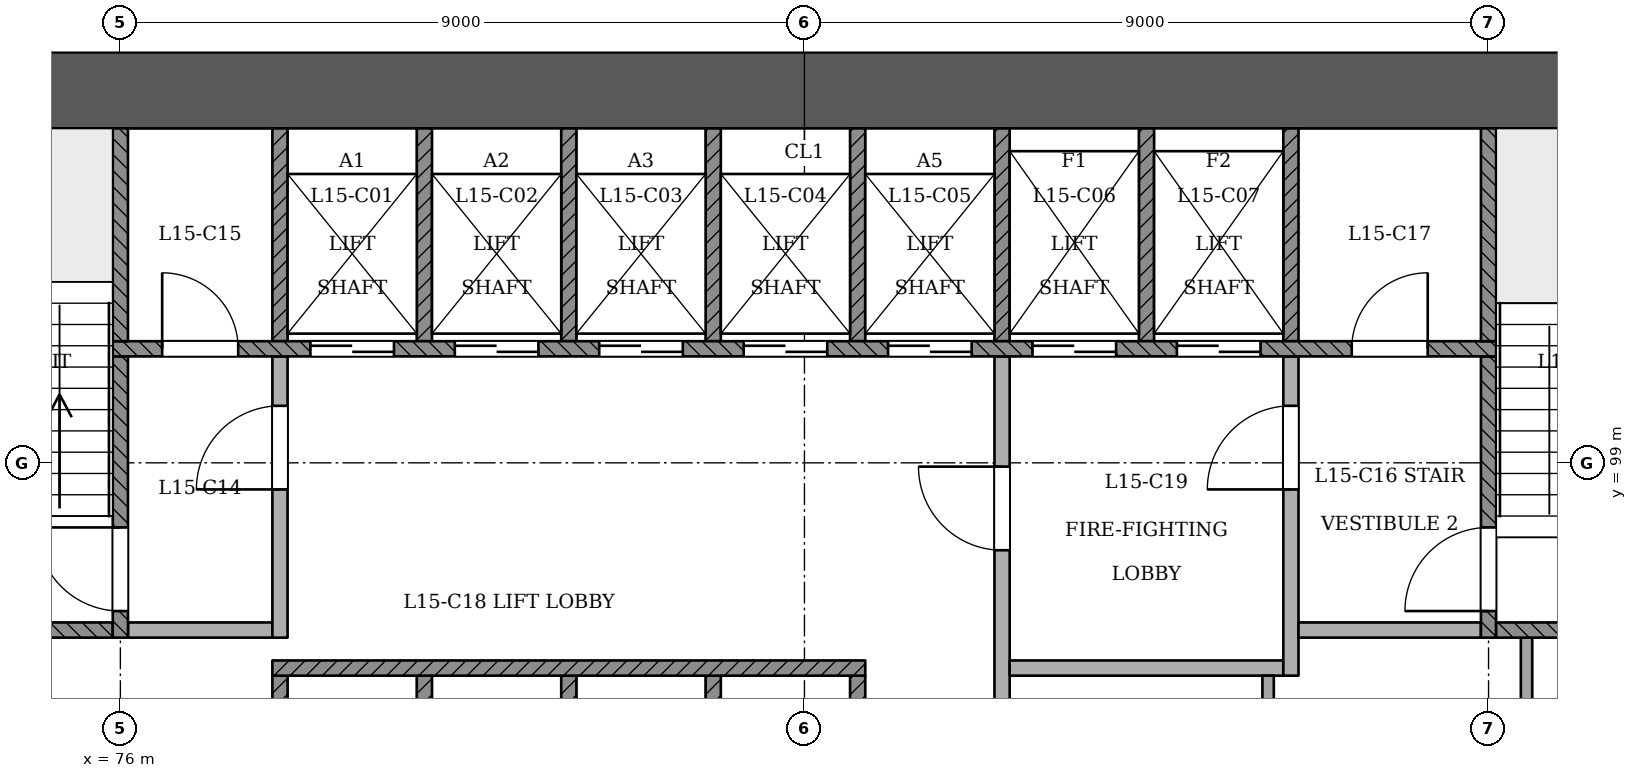
"""IFC4 building model, lengths in metres.
Left out: names, types, materials, properties, quantities, classifications, styles, units other than length and angle.
Written with IfcOpenShell. Run it as: python <this file> out.ifc"""

import sys

from ifc_helpers import new_model, si_unit, direction, frame, frame_2d, origin, place, context, subcontext, project, spatial, rectangle, extrude, element, fill, save


model = new_model("IFC4")
c1 = context("Model", 3, precision=1e-05, world=origin(), true_north=direction((0.0, 1.0)))
c2 = subcontext(c1, "Body", "Model", "MODEL_VIEW")
j1 = project(units=[si_unit("LENGTHUNIT", "METRE"), si_unit("PLANEANGLEUNIT", "RADIAN")], contexts=[c1])
p1 = place(None, origin())
s1 = spatial("IfcSite", under=j1, at=p1, CompositionType="ELEMENT")
p2 = place(p1, origin())
s2 = spatial("IfcBuilding", under=s1, at=p2, CompositionType="ELEMENT")
p3 = place(p2, frame((0.0, 0.0, 63.0)))
s3 = spatial("IfcBuildingStorey", under=s2, at=p3, CompositionType="ELEMENT", Elevation=63.0)
p4 = place(p3, frame((97.5, 103.9, 0.0), z_axis=(0.0, 0.0, 1.0), x_axis=(-1.0, 0.0, 0.0)))
e1 = element("IfcWall", 1, at=p4, inside=s3, PredefinedType="SHEAR", context=c2, shape_type="SweptSolid", body=[
    extrude(rectangle(XDim=25.5, YDim=1.0, at=frame_2d((12.75, 0.0))), origin(), (0.0, 0.0, 1.0), 3.6),
])
p5 = place(p3, frame((62.347, 97.006, 0.0), z_axis=(0.0, 0.0, 1.0), x_axis=(0.500001772576, -0.866024380385, 0.0)))
e2 = element("IfcWall", 2, at=p5, inside=s3, PredefinedType="PARTITIONING", context=c2, shape_type="SweptSolid", body=[
    extrude(rectangle(XDim=43.58, YDim=0.15, at=frame_2d((21.79, 0.0))), origin(), (0.0, 0.0, 1.0), 2.7),
])
p6 = place(p5, frame((3.55, 0.0, 0.0)))
e3 = element("IfcOpeningElement", 3, at=p6, cuts=e2, PredefinedType="OPENING", context=c2, shape_type="SweptSolid", body=[
    extrude(rectangle(XDim=1.2, YDim=2.1, at=frame_2d((0.6, 1.05))), frame((0.0, 0.085, 0.0), z_axis=(0.0, -1.0, 0.0), x_axis=(1.0, 0.0, 0.0)), (0.0, 0.0, 1.0), 0.171),
])
p7 = place(p5, frame((12.19, 0.0, 0.0)))
e4 = element("IfcOpeningElement", 4, at=p7, cuts=e2, PredefinedType="OPENING", context=c2, shape_type="SweptSolid", body=[
    extrude(rectangle(XDim=1.2, YDim=2.1, at=frame_2d((0.6, 1.05))), frame((0.0, 0.085, 0.0), z_axis=(0.0, -1.0, 0.0), x_axis=(1.0, 0.0, 0.0)), (0.0, 0.0, 1.0), 0.171),
])
p8 = place(p5, frame((19.04, 0.0, 0.0)))
e5 = element("IfcOpeningElement", 5, at=p8, cuts=e2, PredefinedType="OPENING", context=c2, shape_type="SweptSolid", body=[
    extrude(rectangle(XDim=1.0, YDim=2.1, at=frame_2d((0.5, 1.05))), frame((0.0, 0.085, 0.0), z_axis=(0.0, -1.0, 0.0), x_axis=(1.0, 0.0, 0.0)), (0.0, 0.0, 1.0), 0.171),
])
p9 = place(p5, frame((27.94, 0.0, 0.0)))
e6 = element("IfcOpeningElement", 6, at=p9, cuts=e2, PredefinedType="OPENING", context=c2, shape_type="SweptSolid", body=[
    extrude(rectangle(XDim=1.2, YDim=2.1, at=frame_2d((0.6, 1.05))), frame((0.0, 0.085, 0.0), z_axis=(0.0, -1.0, 0.0), x_axis=(1.0, 0.0, 0.0)), (0.0, 0.0, 1.0), 0.171),
])
p10 = place(p5, frame((38.831, 0.0, 0.0)))
e7 = element("IfcOpeningElement", 7, at=p10, cuts=e2, PredefinedType="OPENING", context=c2, shape_type="SweptSolid", body=[
    extrude(rectangle(XDim=1.2, YDim=2.1, at=frame_2d((0.6, 1.05))), frame((0.0, 0.085, 0.0), z_axis=(0.0, -1.0, 0.0), x_axis=(1.0, 0.0, 0.0)), (0.0, 0.0, 1.0), 0.171),
])
p11 = place(p3, frame((85.862, 59.265, 0.0), z_axis=(0.0, 0.0, 1.0), x_axis=(0.500001772576, 0.866024380385, 0.0)))
e8 = element("IfcWall", 8, at=p11, inside=s3, PredefinedType="PARTITIONING", context=c2, shape_type="SweptSolid", body=[
    extrude(rectangle(XDim=43.58, YDim=0.15, at=frame_2d((21.79, 0.0))), origin(), (0.0, 0.0, 1.0), 2.7),
])
p12 = place(p11, frame((3.55, 0.0, 0.0)))
e9 = element("IfcOpeningElement", 9, at=p12, cuts=e8, PredefinedType="OPENING", context=c2, shape_type="SweptSolid", body=[
    extrude(rectangle(XDim=1.2, YDim=2.1, at=frame_2d((0.6, 1.05))), frame((0.0, 0.085, 0.0), z_axis=(0.0, -1.0, 0.0), x_axis=(1.0, 0.0, 0.0)), (0.0, 0.0, 1.0), 0.171),
])
p13 = place(p11, frame((14.44, 0.0, 0.0)))
e10 = element("IfcOpeningElement", 10, at=p13, cuts=e8, PredefinedType="OPENING", context=c2, shape_type="SweptSolid", body=[
    extrude(rectangle(XDim=1.2, YDim=2.1, at=frame_2d((0.6, 1.05))), frame((0.0, 0.085, 0.0), z_axis=(0.0, -1.0, 0.0), x_axis=(1.0, 0.0, 0.0)), (0.0, 0.0, 1.0), 0.171),
])
p14 = place(p11, frame((27.94, 0.0, 0.0)))
e11 = element("IfcOpeningElement", 11, at=p14, cuts=e8, PredefinedType="OPENING", context=c2, shape_type="SweptSolid", body=[
    extrude(rectangle(XDim=1.2, YDim=2.1, at=frame_2d((0.6, 1.05))), frame((0.0, 0.085, 0.0), z_axis=(0.0, -1.0, 0.0), x_axis=(1.0, 0.0, 0.0)), (0.0, 0.0, 1.0), 0.171),
])
p15 = place(p11, frame((38.831, 0.0, 0.0)))
e12 = element("IfcOpeningElement", 12, at=p15, cuts=e8, PredefinedType="OPENING", context=c2, shape_type="SweptSolid", body=[
    extrude(rectangle(XDim=1.2, YDim=2.1, at=frame_2d((0.6, 1.05))), frame((0.0, 0.085, 0.0), z_axis=(0.0, -1.0, 0.0), x_axis=(1.0, 0.0, 0.0)), (0.0, 0.0, 1.0), 0.171),
])
for number, where, z_axis, x_axis in (
    (13, (78.1, 93.4, 0.0), (0.0, 0.0, 1.0), (0.0, 1.0, 0.0)),
    (14, (80.0, 93.4, 0.0), (0.0, 0.0, 1.0), (0.0, 1.0, 0.0)),
    (15, (81.9, 93.4, 0.0), (0.0, 0.0, 1.0), (0.0, 1.0, 0.0)),
    (16, (83.8, 93.4, 0.0), (0.0, 0.0, 1.0), (0.0, 1.0, 0.0)),
    (17, (85.7, 93.4, 0.0), (0.0, 0.0, 1.0), (0.0, 1.0, 0.0)),
):
    element("IfcWall", number, at=place(p3, frame(where, z_axis=z_axis, x_axis=x_axis)), inside=s3, PredefinedType="SOLIDWALL", context=c2, shape_type="SweptSolid", body=[
        extrude(rectangle(XDim=2.8, YDim=0.2, at=frame_2d((1.4, 0.0))), origin(), (0.0, 0.0, 1.0), 3.1),
    ])
p16 = place(p3, frame((87.6, 93.4, 0.0), z_axis=(0.0, 0.0, 1.0), x_axis=(0.0, 1.0, 0.0)))
e18 = element("IfcWall", 18, at=p16, inside=s3, PredefinedType="PARTITIONING", context=c2, shape_type="SweptSolid", body=[
    extrude(rectangle(XDim=7.0, YDim=0.2, at=frame_2d((3.5, 0.0))), origin(), (0.0, 0.0, 1.0), 3.1),
])
p17 = place(p16, frame((4.45, 0.0, 0.0)))
e19 = element("IfcOpeningElement", 19, at=p17, cuts=e18, PredefinedType="OPENING", context=c2, shape_type="SweptSolid", body=[
    extrude(rectangle(XDim=1.1, YDim=2.1, at=frame_2d((0.55, 1.05))), frame((0.0, 0.11, 0.0), z_axis=(0.0, -1.0, 0.0), x_axis=(1.0, 0.0, 0.0)), (0.0, 0.0, 1.0), 0.221),
])
p18 = place(p3, frame((91.1, 93.4, 0.0), z_axis=(0.0, 0.0, 1.0), x_axis=(0.0, 1.0, 0.0)))
e20 = element("IfcWall", 20, at=p18, inside=s3, PredefinedType="PARTITIONING", context=c2, shape_type="SweptSolid", body=[
    extrude(rectangle(XDim=2.8, YDim=0.15, at=frame_2d((1.4, 0.0))), origin(), (0.0, 0.0, 1.0), 3.1),
])
p19 = place(p3, frame((94.5, 93.4, 0.0), z_axis=(0.0, 0.0, 1.0), x_axis=(0.0, 1.0, 0.0)))
e21 = element("IfcWall", 21, at=p19, inside=s3, PredefinedType="PARTITIONING", context=c2, shape_type="SweptSolid", body=[
    extrude(rectangle(XDim=3.3, YDim=0.15, at=frame_2d((1.65, 0.0))), origin(), (0.0, 0.0, 1.0), 3.1),
])
p20 = place(p3, frame((78.0, 96.3, 0.0), z_axis=(0.0, 0.0, 1.0), x_axis=(1.0, 0.0, 0.0)))
e22 = element("IfcWall", 22, at=p20, inside=s3, PredefinedType="SOLIDWALL", context=c2, shape_type="SweptSolid", body=[
    extrude(rectangle(XDim=7.8, YDim=0.2, at=frame_2d((3.9, 0.0))), origin(), (0.0, 0.0, 1.0), 3.1),
])
p21 = place(p3, frame((87.7, 96.3, 0.0), z_axis=(0.0, 0.0, 1.0), x_axis=(1.0, 0.0, 0.0)))
e23 = element("IfcWall", 23, at=p21, inside=s3, PredefinedType="PARTITIONING", context=c2, shape_type="SweptSolid", body=[
    extrude(rectangle(XDim=3.6, YDim=0.2, at=frame_2d((1.8, 0.0))), origin(), (0.0, 0.0, 1.0), 3.1),
])
p22 = place(p3, frame((91.4, 96.2, 0.0), z_axis=(0.0, 0.0, 1.0), x_axis=(0.0, 1.0, 0.0)))
e24 = element("IfcWall", 24, at=p22, inside=s3, PredefinedType="PARTITIONING", context=c2, shape_type="SweptSolid", body=[
    extrude(rectangle(XDim=4.2, YDim=0.2, at=frame_2d((2.1, 0.0))), origin(), (0.0, 0.0, 1.0), 3.1),
])
p23 = place(p22, frame((2.45, 0.0, 0.0)))
e25 = element("IfcOpeningElement", 25, at=p23, cuts=e24, PredefinedType="OPENING", context=c2, shape_type="SweptSolid", body=[
    extrude(rectangle(XDim=1.1, YDim=2.1, at=frame_2d((0.55, 1.05))), frame((0.0, 0.11, 0.0), z_axis=(0.0, -1.0, 0.0), x_axis=(1.0, 0.0, 0.0)), (0.0, 0.0, 1.0), 0.221),
])
p24 = place(p3, frame((73.0, 96.8, 0.0), z_axis=(0.0, 0.0, 1.0), x_axis=(1.0, 0.0, 0.0)))
e26 = element("IfcWall", 26, at=p24, inside=s3, PredefinedType="SOLIDWALL", context=c2, shape_type="SweptSolid", body=[
    extrude(rectangle(XDim=2.9, YDim=0.2, at=frame_2d((1.45, 0.0))), origin(), (0.0, 0.0, 1.0), 3.1),
])
p25 = place(p3, frame((76.0, 96.7, 0.0), z_axis=(0.0, 0.0, 1.0), x_axis=(0.0, 1.0, 0.0)))
e27 = element("IfcWall", 27, at=p25, inside=s3, PredefinedType="SOLIDWALL", context=c2, shape_type="SweptSolid", body=[
    extrude(rectangle(XDim=3.7, YDim=0.2, at=frame_2d((1.85, 0.0))), origin(), (0.0, 0.0, 1.0), 3.1),
])
p26 = place(p25, frame((0.35, 0.0, 0.0)))
e28 = element("IfcOpeningElement", 28, at=p26, cuts=e27, PredefinedType="OPENING", context=c2, shape_type="SweptSolid", body=[
    extrude(rectangle(XDim=1.1, YDim=2.1, at=frame_2d((0.55, 1.05))), frame((0.0, 0.11, 0.0), z_axis=(0.0, -1.0, 0.0), x_axis=(1.0, 0.0, 0.0)), (0.0, 0.0, 1.0), 0.221),
])
p27 = place(p3, frame((76.1, 96.8, 0.0), z_axis=(0.0, 0.0, 1.0), x_axis=(1.0, 0.0, 0.0)))
e29 = element("IfcWall", 29, at=p27, inside=s3, PredefinedType="PARTITIONING", context=c2, shape_type="SweptSolid", body=[
    extrude(rectangle(XDim=1.9, YDim=0.2, at=frame_2d((0.95, 0.0))), origin(), (0.0, 0.0, 1.0), 3.1),
])
p28 = place(p3, frame((78.1, 96.7, 0.0), z_axis=(0.0, 0.0, 1.0), x_axis=(0.0, 1.0, 0.0)))
e30 = element("IfcWall", 30, at=p28, inside=s3, PredefinedType="PARTITIONING", context=c2, shape_type="SweptSolid", body=[
    extrude(rectangle(XDim=3.7, YDim=0.2, at=frame_2d((1.85, 0.0))), origin(), (0.0, 0.0, 1.0), 3.1),
])
p29 = place(p28, frame((1.95, 0.0, 0.0)))
e31 = element("IfcOpeningElement", 31, at=p29, cuts=e30, PredefinedType="OPENING", context=c2, shape_type="SweptSolid", body=[
    extrude(rectangle(XDim=1.1, YDim=2.1, at=frame_2d((0.55, 1.05))), frame((0.0, 0.11, 0.0), z_axis=(0.0, -1.0, 0.0), x_axis=(1.0, 0.0, 0.0)), (0.0, 0.0, 1.0), 0.221),
])
p30 = place(p3, frame((91.5, 96.8, 0.0), z_axis=(0.0, 0.0, 1.0), x_axis=(1.0, 0.0, 0.0)))
e32 = element("IfcWall", 32, at=p30, inside=s3, PredefinedType="PARTITIONING", context=c2, shape_type="SweptSolid", body=[
    extrude(rectangle(XDim=2.4, YDim=0.2, at=frame_2d((1.2, 0.0))), origin(), (0.0, 0.0, 1.0), 3.1),
])
p31 = place(p3, frame((94.0, 96.7, 0.0), z_axis=(0.0, 0.0, 1.0), x_axis=(0.0, 1.0, 0.0)))
e33 = element("IfcWall", 33, at=p31, inside=s3, PredefinedType="SOLIDWALL", context=c2, shape_type="SweptSolid", body=[
    extrude(rectangle(XDim=3.7, YDim=0.2, at=frame_2d((1.85, 0.0))), origin(), (0.0, 0.0, 1.0), 3.1),
])
p32 = place(p31, frame((0.35, 0.0, 0.0)))
e34 = element("IfcOpeningElement", 34, at=p32, cuts=e33, PredefinedType="OPENING", context=c2, shape_type="SweptSolid", body=[
    extrude(rectangle(XDim=1.1, YDim=2.1, at=frame_2d((0.55, 1.05))), frame((0.0, 0.11, 0.0), z_axis=(0.0, -1.0, 0.0), x_axis=(1.0, 0.0, 0.0)), (0.0, 0.0, 1.0), 0.221),
])
p33 = place(p3, frame((94.1, 96.8, 0.0), z_axis=(0.0, 0.0, 1.0), x_axis=(1.0, 0.0, 0.0)))
e35 = element("IfcWall", 35, at=p33, inside=s3, PredefinedType="SOLIDWALL", context=c2, shape_type="SweptSolid", body=[
    extrude(rectangle(XDim=2.9, YDim=0.2, at=frame_2d((1.45, 0.0))), origin(), (0.0, 0.0, 1.0), 3.1),
])
p34 = place(p3, frame((75.9, 100.5, 0.0), z_axis=(0.0, 0.0, 1.0), x_axis=(1.0, 0.0, 0.0)))
e36 = element("IfcWall", 36, at=p34, inside=s3, PredefinedType="SOLIDWALL", context=c2, shape_type="SweptSolid", body=[
    extrude(rectangle(XDim=18.2, YDim=0.2, at=frame_2d((9.1, 0.0))), origin(), (0.0, 0.0, 1.0), 3.1),
])
p35 = place(p34, frame((2.6, 0.0, 0.0)))
e37 = element("IfcOpeningElement", 37, at=p35, cuts=e36, PredefinedType="OPENING", context=c2, shape_type="SweptSolid", body=[
    extrude(rectangle(XDim=1.1, YDim=2.1, at=frame_2d((0.55, 1.05))), frame((0.0, 0.11, 0.0), z_axis=(0.0, -1.0, 0.0), x_axis=(1.0, 0.0, 0.0)), (0.0, 0.0, 1.0), 0.221),
])
p36 = place(p34, frame((4.5, 0.0, 0.0)))
e38 = element("IfcOpeningElement", 38, at=p36, cuts=e36, PredefinedType="OPENING", context=c2, shape_type="SweptSolid", body=[
    extrude(rectangle(XDim=1.1, YDim=2.1, at=frame_2d((0.55, 1.05))), frame((0.0, 0.11, 0.0), z_axis=(0.0, -1.0, 0.0), x_axis=(1.0, 0.0, 0.0)), (0.0, 0.0, 1.0), 0.221),
])
p37 = place(p34, frame((6.4, 0.0, 0.0)))
e39 = element("IfcOpeningElement", 39, at=p37, cuts=e36, PredefinedType="OPENING", context=c2, shape_type="SweptSolid", body=[
    extrude(rectangle(XDim=1.1, YDim=2.1, at=frame_2d((0.55, 1.05))), frame((0.0, 0.11, 0.0), z_axis=(0.0, -1.0, 0.0), x_axis=(1.0, 0.0, 0.0)), (0.0, 0.0, 1.0), 0.221),
])
p38 = place(p34, frame((8.3, 0.0, 0.0)))
e40 = element("IfcOpeningElement", 40, at=p38, cuts=e36, PredefinedType="OPENING", context=c2, shape_type="SweptSolid", body=[
    extrude(rectangle(XDim=1.1, YDim=2.1, at=frame_2d((0.55, 1.05))), frame((0.0, 0.11, 0.0), z_axis=(0.0, -1.0, 0.0), x_axis=(1.0, 0.0, 0.0)), (0.0, 0.0, 1.0), 0.221),
])
p39 = place(p34, frame((10.2, 0.0, 0.0)))
e41 = element("IfcOpeningElement", 41, at=p39, cuts=e36, PredefinedType="OPENING", context=c2, shape_type="SweptSolid", body=[
    extrude(rectangle(XDim=1.1, YDim=2.1, at=frame_2d((0.55, 1.05))), frame((0.0, 0.11, 0.0), z_axis=(0.0, -1.0, 0.0), x_axis=(1.0, 0.0, 0.0)), (0.0, 0.0, 1.0), 0.221),
])
p40 = place(p34, frame((12.1, 0.0, 0.0)))
e42 = element("IfcOpeningElement", 42, at=p40, cuts=e36, PredefinedType="OPENING", context=c2, shape_type="SweptSolid", body=[
    extrude(rectangle(XDim=1.1, YDim=2.1, at=frame_2d((0.55, 1.05))), frame((0.0, 0.11, 0.0), z_axis=(0.0, -1.0, 0.0), x_axis=(1.0, 0.0, 0.0)), (0.0, 0.0, 1.0), 0.221),
])
p41 = place(p34, frame((14.0, 0.0, 0.0)))
e43 = element("IfcOpeningElement", 43, at=p41, cuts=e36, PredefinedType="OPENING", context=c2, shape_type="SweptSolid", body=[
    extrude(rectangle(XDim=1.1, YDim=2.1, at=frame_2d((0.55, 1.05))), frame((0.0, 0.11, 0.0), z_axis=(0.0, -1.0, 0.0), x_axis=(1.0, 0.0, 0.0)), (0.0, 0.0, 1.0), 0.221),
])
p42 = place(p34, frame((0.65, 0.0, 0.0)))
e44 = element("IfcOpeningElement", 44, at=p42, cuts=e36, PredefinedType="OPENING", context=c2, shape_type="SweptSolid", body=[
    extrude(rectangle(XDim=1.0, YDim=2.1, at=frame_2d((0.5, 1.05))), frame((0.0, 0.11, 0.0), z_axis=(0.0, -1.0, 0.0), x_axis=(1.0, 0.0, 0.0)), (0.0, 0.0, 1.0), 0.221),
])
p43 = place(p34, frame((16.3, 0.0, 0.0)))
e45 = element("IfcOpeningElement", 45, at=p43, cuts=e36, PredefinedType="OPENING", context=c2, shape_type="SweptSolid", body=[
    extrude(rectangle(XDim=1.0, YDim=2.1, at=frame_2d((0.5, 1.05))), frame((0.0, 0.11, 0.0), z_axis=(0.0, -1.0, 0.0), x_axis=(1.0, 0.0, 0.0)), (0.0, 0.0, 1.0), 0.221),
])
for number, where, z_axis, x_axis in (
    (46, (76.0, 100.6, 0.0), (0.0, 0.0, 1.0), (0.0, 1.0, 0.0)),
    (47, (78.1, 100.6, 0.0), (0.0, 0.0, 1.0), (0.0, 1.0, 0.0)),
    (48, (80.0, 100.6, 0.0), (0.0, 0.0, 1.0), (0.0, 1.0, 0.0)),
    (49, (81.9, 100.6, 0.0), (0.0, 0.0, 1.0), (0.0, 1.0, 0.0)),
    (50, (83.8, 100.6, 0.0), (0.0, 0.0, 1.0), (0.0, 1.0, 0.0)),
    (51, (85.7, 100.6, 0.0), (0.0, 0.0, 1.0), (0.0, 1.0, 0.0)),
    (52, (87.6, 100.6, 0.0), (0.0, 0.0, 1.0), (0.0, 1.0, 0.0)),
    (53, (89.5, 100.6, 0.0), (0.0, 0.0, 1.0), (0.0, 1.0, 0.0)),
    (54, (91.4, 100.6, 0.0), (0.0, 0.0, 1.0), (0.0, 1.0, 0.0)),
    (55, (94.0, 100.6, 0.0), (0.0, 0.0, 1.0), (0.0, 1.0, 0.0)),
):
    element("IfcWall", number, at=place(p3, frame(where, z_axis=z_axis, x_axis=x_axis)), inside=s3, PredefinedType="SOLIDWALL", context=c2, shape_type="SweptSolid", body=[
        extrude(rectangle(XDim=2.8, YDim=0.2, at=frame_2d((1.4, 0.0))), origin(), (0.0, 0.0, 1.0), 3.1),
    ])
p44 = place(p35, origin())
e56 = element("IfcDoor", 56, at=p44, inside=s3, OperationType="SLIDING_TO_RIGHT", PredefinedType="NOTDEFINED", context=c2, shape_type="SweptSolid", body=[
    extrude(rectangle(XDim=1.1, YDim=2.1, at=frame_2d((0.55, 1.05))), frame((0.0, 0.025, 0.0), z_axis=(0.0, -1.0, 0.0), x_axis=(1.0, 0.0, 0.0)), (0.0, 0.0, 1.0), 0.05),
])
fill(e37, e56)
p45 = place(p36, origin())
e57 = element("IfcDoor", 57, at=p45, inside=s3, OperationType="SLIDING_TO_LEFT", PredefinedType="NOTDEFINED", context=c2, shape_type="SweptSolid", body=[
    extrude(rectangle(XDim=1.1, YDim=2.1, at=frame_2d((0.55, 1.05))), frame((0.0, 0.025, 0.0), z_axis=(0.0, -1.0, 0.0), x_axis=(1.0, 0.0, 0.0)), (0.0, 0.0, 1.0), 0.05),
])
fill(e38, e57)
p46 = place(p37, origin())
e58 = element("IfcDoor", 58, at=p46, inside=s3, OperationType="SLIDING_TO_RIGHT", PredefinedType="NOTDEFINED", context=c2, shape_type="SweptSolid", body=[
    extrude(rectangle(XDim=1.1, YDim=2.1, at=frame_2d((0.55, 1.05))), frame((0.0, 0.025, 0.0), z_axis=(0.0, -1.0, 0.0), x_axis=(1.0, 0.0, 0.0)), (0.0, 0.0, 1.0), 0.05),
])
fill(e39, e58)
p47 = place(p38, origin())
e59 = element("IfcDoor", 59, at=p47, inside=s3, OperationType="SLIDING_TO_LEFT", PredefinedType="NOTDEFINED", context=c2, shape_type="SweptSolid", body=[
    extrude(rectangle(XDim=1.1, YDim=2.1, at=frame_2d((0.55, 1.05))), frame((0.0, 0.025, 0.0), z_axis=(0.0, -1.0, 0.0), x_axis=(1.0, 0.0, 0.0)), (0.0, 0.0, 1.0), 0.05),
])
fill(e40, e59)
p48 = place(p39, origin())
e60 = element("IfcDoor", 60, at=p48, inside=s3, OperationType="SLIDING_TO_RIGHT", PredefinedType="NOTDEFINED", context=c2, shape_type="SweptSolid", body=[
    extrude(rectangle(XDim=1.1, YDim=2.1, at=frame_2d((0.55, 1.05))), frame((0.0, 0.025, 0.0), z_axis=(0.0, -1.0, 0.0), x_axis=(1.0, 0.0, 0.0)), (0.0, 0.0, 1.0), 0.05),
])
fill(e41, e60)
p49 = place(p40, origin())
e61 = element("IfcDoor", 61, at=p49, inside=s3, OperationType="SLIDING_TO_RIGHT", PredefinedType="NOTDEFINED", context=c2, shape_type="SweptSolid", body=[
    extrude(rectangle(XDim=1.1, YDim=2.1, at=frame_2d((0.55, 1.05))), frame((0.0, 0.025, 0.0), z_axis=(0.0, -1.0, 0.0), x_axis=(1.0, 0.0, 0.0)), (0.0, 0.0, 1.0), 0.05),
])
fill(e42, e61)
p50 = place(p41, origin())
e62 = element("IfcDoor", 62, at=p50, inside=s3, OperationType="SLIDING_TO_LEFT", PredefinedType="NOTDEFINED", context=c2, shape_type="SweptSolid", body=[
    extrude(rectangle(XDim=1.1, YDim=2.1, at=frame_2d((0.55, 1.05))), frame((0.0, 0.025, 0.0), z_axis=(0.0, -1.0, 0.0), x_axis=(1.0, 0.0, 0.0)), (0.0, 0.0, 1.0), 0.05),
])
fill(e43, e62)
p51 = place(p26, origin())
e63 = element("IfcDoor", 63, at=p51, inside=s3, OperationType="SINGLE_SWING_RIGHT", PredefinedType="NOTDEFINED", context=c2, shape_type="SweptSolid", body=[
    extrude(rectangle(XDim=1.1, YDim=2.1, at=frame_2d((0.55, 1.05))), frame((0.0, 0.025, 0.0), z_axis=(0.0, -1.0, 0.0), x_axis=(1.0, 0.0, 0.0)), (0.0, 0.0, 1.0), 0.05),
])
fill(e28, e63)
p52 = place(p32, origin())
e64 = element("IfcDoor", 64, at=p52, inside=s3, OperationType="SINGLE_SWING_LEFT", PredefinedType="NOTDEFINED", context=c2, shape_type="SweptSolid", body=[
    extrude(rectangle(XDim=1.1, YDim=2.1, at=frame_2d((0.55, 1.05))), frame((0.0, 0.025, 0.0), z_axis=(0.0, -1.0, 0.0), x_axis=(1.0, 0.0, 0.0)), (0.0, 0.0, 1.0), 0.05),
])
fill(e34, e64)
p53 = place(p29, origin())
e65 = element("IfcDoor", 65, at=p53, inside=s3, OperationType="SINGLE_SWING_LEFT", PredefinedType="NOTDEFINED", context=c2, shape_type="SweptSolid", body=[
    extrude(rectangle(XDim=1.1, YDim=2.1, at=frame_2d((0.55, 1.05))), frame((0.0, 0.025, 0.0), z_axis=(0.0, -1.0, 0.0), x_axis=(1.0, 0.0, 0.0)), (0.0, 0.0, 1.0), 0.05),
])
fill(e31, e65)
p54 = place(p17, origin())
e66 = element("IfcDoor", 66, at=p54, inside=s3, OperationType="SINGLE_SWING_RIGHT", PredefinedType="NOTDEFINED", context=c2, shape_type="SweptSolid", body=[
    extrude(rectangle(XDim=1.1, YDim=2.1, at=frame_2d((0.55, 1.05))), frame((0.0, 0.025, 0.0), z_axis=(0.0, -1.0, 0.0), x_axis=(1.0, 0.0, 0.0)), (0.0, 0.0, 1.0), 0.05),
])
fill(e19, e66)
p55 = place(p23, origin())
e67 = element("IfcDoor", 67, at=p55, inside=s3, OperationType="SINGLE_SWING_LEFT", PredefinedType="NOTDEFINED", context=c2, shape_type="SweptSolid", body=[
    extrude(rectangle(XDim=1.1, YDim=2.1, at=frame_2d((0.55, 1.05))), frame((0.0, 0.025, 0.0), z_axis=(0.0, -1.0, 0.0), x_axis=(1.0, 0.0, 0.0)), (0.0, 0.0, 1.0), 0.05),
])
fill(e25, e67)
p56 = place(p42, origin())
e68 = element("IfcDoor", 68, at=p56, inside=s3, OperationType="SINGLE_SWING_LEFT", PredefinedType="NOTDEFINED", context=c2, shape_type="SweptSolid", body=[
    extrude(rectangle(XDim=1.0, YDim=2.1, at=frame_2d((0.5, 1.05))), frame((0.0, 0.025, 0.0), z_axis=(0.0, -1.0, 0.0), x_axis=(1.0, 0.0, 0.0)), (0.0, 0.0, 1.0), 0.05),
])
fill(e44, e68)
p57 = place(p43, origin())
e69 = element("IfcDoor", 69, at=p57, inside=s3, OperationType="SINGLE_SWING_RIGHT", PredefinedType="NOTDEFINED", context=c2, shape_type="SweptSolid", body=[
    extrude(rectangle(XDim=1.0, YDim=2.1, at=frame_2d((0.5, 1.05))), frame((0.0, 0.025, 0.0), z_axis=(0.0, -1.0, 0.0), x_axis=(1.0, 0.0, 0.0)), (0.0, 0.0, 1.0), 0.05),
])
fill(e45, e69)
save(model, sys.argv[1])
